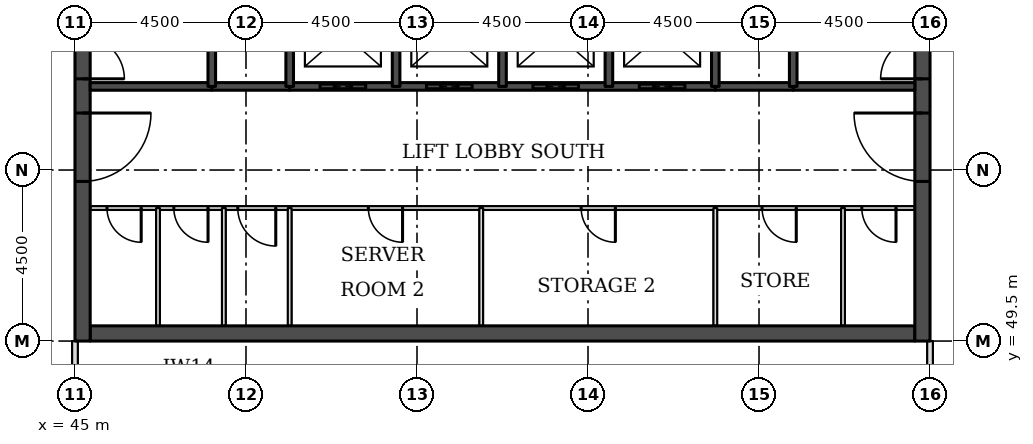
"""IFC4 building model, lengths in metres.
Left out: names, types, materials, properties, quantities, classifications, styles, units other than length and angle.
Written with IfcOpenShell. Run it as: python <this file> out.ifc"""

import sys

from ifc_helpers import new_model, si_unit, direction, frame, frame_2d, origin, place, context, subcontext, project, spatial, rectangle, extrude, element, fill, save


model = new_model("IFC4")
c1 = context("Model", 3, precision=1e-05, world=origin(), true_north=direction((0.0, 1.0)))
c2 = subcontext(c1, "Body", "Model", "MODEL_VIEW")
j1 = project(units=[si_unit("LENGTHUNIT", "METRE"), si_unit("PLANEANGLEUNIT", "RADIAN")], contexts=[c1])
p1 = place(None, origin())
s1 = spatial("IfcSite", under=j1, at=p1, CompositionType="ELEMENT")
p2 = place(p1, origin())
s2 = spatial("IfcBuilding", under=s1, at=p2, CompositionType="ELEMENT")
p3 = place(p2, frame((0.0, 0.0, 147.7)))
s3 = spatial("IfcBuildingStorey", under=s2, at=p3, CompositionType="ELEMENT", Elevation=147.7)
p4 = place(p3, frame((45.4, 49.7, 0.0), z_axis=(0.0, 0.0, 1.0), x_axis=(1.0, 0.0, 0.0)))
e1 = element("IfcWall", 1, at=p4, inside=s3, PredefinedType="SHEAR", context=c2, shape_type="SweptSolid", body=[
    extrude(rectangle(XDim=21.7, YDim=0.4, at=frame_2d((10.85, 0.0))), origin(), (0.0, 0.0, 1.0), 3.7),
])
p5 = place(p3, frame((45.2, 49.5, 0.0), z_axis=(0.0, 0.0, 1.0), x_axis=(0.0, 1.0, 0.0)))
e2 = element("IfcWall", 2, at=p5, inside=s3, PredefinedType="SHEAR", context=c2, shape_type="SweptSolid", body=[
    extrude(rectangle(XDim=22.5, YDim=0.4, at=frame_2d((11.25, 0.0))), origin(), (0.0, 0.0, 1.0), 3.7),
])
p6 = place(p5, frame((4.2, 0.0, 0.0)))
e3 = element("IfcOpeningElement", 3, at=p6, cuts=e2, PredefinedType="OPENING", context=c2, shape_type="SweptSolid", body=[
    extrude(rectangle(XDim=1.8, YDim=2.1, at=frame_2d((0.9, 1.05))), frame((0.0, 0.21, 0.0), z_axis=(0.0, -1.0, 0.0), x_axis=(1.0, 0.0, 0.0)), (0.0, 0.0, 1.0), 0.42),
])
p7 = place(p5, frame((6.9, 0.0, 0.0)))
e4 = element("IfcOpeningElement", 4, at=p7, cuts=e2, PredefinedType="OPENING", context=c2, shape_type="SweptSolid", body=[
    extrude(rectangle(XDim=1.1, YDim=2.1, at=frame_2d((0.55, 1.05))), frame((0.0, 0.21, 0.0), z_axis=(0.0, -1.0, 0.0), x_axis=(1.0, 0.0, 0.0)), (0.0, 0.0, 1.0), 0.42),
])
p8 = place(p5, frame((13.6, 0.0, 0.0)))
e5 = element("IfcOpeningElement", 5, at=p8, cuts=e2, PredefinedType="OPENING", context=c2, shape_type="SweptSolid", body=[
    extrude(rectangle(XDim=1.1, YDim=2.1, at=frame_2d((0.55, 1.05))), frame((0.0, 0.21, 0.0), z_axis=(0.0, -1.0, 0.0), x_axis=(1.0, 0.0, 0.0)), (0.0, 0.0, 1.0), 0.42),
])
p9 = place(p5, frame((16.5, 0.0, 0.0)))
e6 = element("IfcOpeningElement", 6, at=p9, cuts=e2, PredefinedType="OPENING", context=c2, shape_type="SweptSolid", body=[
    extrude(rectangle(XDim=1.8, YDim=2.1, at=frame_2d((0.9, 1.05))), frame((0.0, 0.21, 0.0), z_axis=(0.0, -1.0, 0.0), x_axis=(1.0, 0.0, 0.0)), (0.0, 0.0, 1.0), 0.42),
])
p10 = place(p3, frame((67.3, 49.5, 0.0), z_axis=(0.0, 0.0, 1.0), x_axis=(0.0, 1.0, 0.0)))
e7 = element("IfcWall", 7, at=p10, inside=s3, PredefinedType="SHEAR", context=c2, shape_type="SweptSolid", body=[
    extrude(rectangle(XDim=22.5, YDim=0.4, at=frame_2d((11.25, 0.0))), origin(), (0.0, 0.0, 1.0), 3.7),
])
p11 = place(p10, frame((4.2, 0.0, 0.0)))
e8 = element("IfcOpeningElement", 8, at=p11, cuts=e7, PredefinedType="OPENING", context=c2, shape_type="SweptSolid", body=[
    extrude(rectangle(XDim=1.8, YDim=2.1, at=frame_2d((0.9, 1.05))), frame((0.0, 0.21, 0.0), z_axis=(0.0, -1.0, 0.0), x_axis=(1.0, 0.0, 0.0)), (0.0, 0.0, 1.0), 0.42),
])
p12 = place(p10, frame((6.9, 0.0, 0.0)))
e9 = element("IfcOpeningElement", 9, at=p12, cuts=e7, PredefinedType="OPENING", context=c2, shape_type="SweptSolid", body=[
    extrude(rectangle(XDim=1.1, YDim=2.1, at=frame_2d((0.55, 1.05))), frame((0.0, 0.21, 0.0), z_axis=(0.0, -1.0, 0.0), x_axis=(1.0, 0.0, 0.0)), (0.0, 0.0, 1.0), 0.42),
])
p13 = place(p10, frame((13.6, 0.0, 0.0)))
e10 = element("IfcOpeningElement", 10, at=p13, cuts=e7, PredefinedType="OPENING", context=c2, shape_type="SweptSolid", body=[
    extrude(rectangle(XDim=1.1, YDim=2.1, at=frame_2d((0.55, 1.05))), frame((0.0, 0.21, 0.0), z_axis=(0.0, -1.0, 0.0), x_axis=(1.0, 0.0, 0.0)), (0.0, 0.0, 1.0), 0.42),
])
p14 = place(p10, frame((16.5, 0.0, 0.0)))
e11 = element("IfcOpeningElement", 11, at=p14, cuts=e7, PredefinedType="OPENING", context=c2, shape_type="SweptSolid", body=[
    extrude(rectangle(XDim=1.8, YDim=2.1, at=frame_2d((0.9, 1.05))), frame((0.0, 0.21, 0.0), z_axis=(0.0, -1.0, 0.0), x_axis=(1.0, 0.0, 0.0)), (0.0, 0.0, 1.0), 0.42),
])
p15 = place(p3, frame((67.5, 46.5, 0.0), z_axis=(0.0, 0.0, 1.0), x_axis=(0.0, 1.0, 0.0)))
e12 = element("IfcWall", 12, at=p15, inside=s3, PredefinedType="PARTITIONING", context=c2, shape_type="SweptSolid", body=[
    extrude(rectangle(XDim=3.0, YDim=0.15, at=frame_2d((1.5, 0.0))), origin(), (0.0, 0.0, 1.0), 3.022),
])
p16 = place(p3, frame((45.0, 48.0, 0.0), z_axis=(0.0, 0.0, 1.0), x_axis=(0.0, 1.0, 0.0)))
e13 = element("IfcWall", 13, at=p16, inside=s3, PredefinedType="PARTITIONING", context=c2, shape_type="SweptSolid", body=[
    extrude(rectangle(XDim=1.5, YDim=0.15, at=frame_2d((0.75, 0.0))), origin(), (0.0, 0.0, 1.0), 3.022),
])
p17 = place(p3, frame((45.4, 53.0, 0.0), z_axis=(0.0, 0.0, 1.0), x_axis=(1.0, 0.0, 0.0)))
e14 = element("IfcWall", 14, at=p17, inside=s3, PredefinedType="PARTITIONING", context=c2, shape_type="SweptSolid", body=[
    extrude(rectangle(XDim=21.7, YDim=0.1, at=frame_2d((10.85, 0.0))), origin(), (0.0, 0.0, 1.0), 3.55),
])
p18 = place(p17, frame((20.305, 0.0, 0.0)))
e15 = element("IfcOpeningElement", 15, at=p18, cuts=e14, PredefinedType="OPENING", context=c2, shape_type="SweptSolid", body=[
    extrude(rectangle(XDim=0.9, YDim=2.1, at=frame_2d((0.45, 1.05))), frame((0.0, 0.06, 0.0), z_axis=(0.0, -1.0, 0.0), x_axis=(1.0, 0.0, 0.0)), (0.0, 0.0, 1.0), 0.12),
])
p19 = place(p17, frame((17.68, 0.0, 0.0)))
e16 = element("IfcOpeningElement", 16, at=p19, cuts=e14, PredefinedType="OPENING", context=c2, shape_type="SweptSolid", body=[
    extrude(rectangle(XDim=0.9, YDim=2.1, at=frame_2d((0.45, 1.05))), frame((0.0, 0.06, 0.0), z_axis=(0.0, -1.0, 0.0), x_axis=(1.0, 0.0, 0.0)), (0.0, 0.0, 1.0), 0.12),
])
p20 = place(p17, frame((0.442, 0.0, 0.0)))
e17 = element("IfcOpeningElement", 17, at=p20, cuts=e14, PredefinedType="OPENING", context=c2, shape_type="SweptSolid", body=[
    extrude(rectangle(XDim=0.9, YDim=2.1, at=frame_2d((0.45, 1.05))), frame((0.0, 0.06, 0.0), z_axis=(0.0, -1.0, 0.0), x_axis=(1.0, 0.0, 0.0)), (0.0, 0.0, 1.0), 0.12),
])
p21 = place(p17, frame((2.201, 0.0, 0.0)))
e18 = element("IfcOpeningElement", 18, at=p21, cuts=e14, PredefinedType="OPENING", context=c2, shape_type="SweptSolid", body=[
    extrude(rectangle(XDim=0.9, YDim=2.1, at=frame_2d((0.45, 1.05))), frame((0.0, 0.06, 0.0), z_axis=(0.0, -1.0, 0.0), x_axis=(1.0, 0.0, 0.0)), (0.0, 0.0, 1.0), 0.12),
])
p22 = place(p17, frame((3.884, 0.0, 0.0)))
e19 = element("IfcOpeningElement", 19, at=p22, cuts=e14, PredefinedType="OPENING", context=c2, shape_type="SweptSolid", body=[
    extrude(rectangle(XDim=1.0, YDim=2.1, at=frame_2d((0.5, 1.05))), frame((0.0, 0.06, 0.0), z_axis=(0.0, -1.0, 0.0), x_axis=(1.0, 0.0, 0.0)), (0.0, 0.0, 1.0), 0.12),
])
p23 = place(p17, frame((7.32, 0.0, 0.0)))
e20 = element("IfcOpeningElement", 20, at=p23, cuts=e14, PredefinedType="OPENING", context=c2, shape_type="SweptSolid", body=[
    extrude(rectangle(XDim=0.9, YDim=2.1, at=frame_2d((0.45, 1.05))), frame((0.0, 0.06, 0.0), z_axis=(0.0, -1.0, 0.0), x_axis=(1.0, 0.0, 0.0)), (0.0, 0.0, 1.0), 0.12),
])
p24 = place(p17, frame((12.92, 0.0, 0.0)))
e21 = element("IfcOpeningElement", 21, at=p24, cuts=e14, PredefinedType="OPENING", context=c2, shape_type="SweptSolid", body=[
    extrude(rectangle(XDim=0.9, YDim=2.1, at=frame_2d((0.45, 1.05))), frame((0.0, 0.06, 0.0), z_axis=(0.0, -1.0, 0.0), x_axis=(1.0, 0.0, 0.0)), (0.0, 0.0, 1.0), 0.12),
])
for number, where, z_axis, x_axis in (
    (22, (48.6, 56.2, 0.0), (0.0, 0.0, 1.0), (1.0, 0.0, 0.0)),
    (23, (61.85, 56.2, 0.0), (0.0, 0.0, 1.0), (1.0, 0.0, 0.0)),
):
    element("IfcWall", number, at=place(p3, frame(where, z_axis=z_axis, x_axis=x_axis)), inside=s3, PredefinedType="SOLIDWALL", context=c2, shape_type="SweptSolid", body=[
        extrude(rectangle(XDim=2.05, YDim=0.2, at=frame_2d((1.025, 0.0))), origin(), (0.0, 0.0, 1.0), 3.55),
    ])
p25 = place(p3, frame((45.4, 56.2, 0.0), z_axis=(0.0, 0.0, 1.0), x_axis=(1.0, 0.0, 0.0)))
e24 = element("IfcWall", 24, at=p25, inside=s3, PredefinedType="SOLIDWALL", context=c2, shape_type="SweptSolid", body=[
    extrude(rectangle(XDim=3.2, YDim=0.2, at=frame_2d((1.6, 0.0))), origin(), (0.0, 0.0, 1.0), 3.55),
])
p26 = place(p3, frame((50.65, 56.2, 0.0), z_axis=(0.0, 0.0, 1.0), x_axis=(1.0, 0.0, 0.0)))
e25 = element("IfcWall", 25, at=p26, inside=s3, PredefinedType="SOLIDWALL", context=c2, shape_type="SweptSolid", body=[
    extrude(rectangle(XDim=11.2, YDim=0.2, at=frame_2d((5.6, 0.0))), origin(), (0.0, 0.0, 1.0), 3.55),
])
p27 = place(p26, frame((0.8, 0.0, 0.0)))
e26 = element("IfcOpeningElement", 26, at=p27, cuts=e25, PredefinedType="OPENING", context=c2, shape_type="SweptSolid", body=[
    extrude(rectangle(XDim=1.2, YDim=2.1, at=frame_2d((0.6, 1.05))), frame((0.0, 0.11, 0.0), z_axis=(0.0, -1.0, 0.0), x_axis=(1.0, 0.0, 0.0)), (0.0, 0.0, 1.0), 0.22),
])
p28 = place(p26, frame((3.6, 0.0, 0.0)))
e27 = element("IfcOpeningElement", 27, at=p28, cuts=e25, PredefinedType="OPENING", context=c2, shape_type="SweptSolid", body=[
    extrude(rectangle(XDim=1.2, YDim=2.1, at=frame_2d((0.6, 1.05))), frame((0.0, 0.11, 0.0), z_axis=(0.0, -1.0, 0.0), x_axis=(1.0, 0.0, 0.0)), (0.0, 0.0, 1.0), 0.22),
])
p29 = place(p26, frame((6.4, 0.0, 0.0)))
e28 = element("IfcOpeningElement", 28, at=p29, cuts=e25, PredefinedType="OPENING", context=c2, shape_type="SweptSolid", body=[
    extrude(rectangle(XDim=1.2, YDim=2.1, at=frame_2d((0.6, 1.05))), frame((0.0, 0.11, 0.0), z_axis=(0.0, -1.0, 0.0), x_axis=(1.0, 0.0, 0.0)), (0.0, 0.0, 1.0), 0.22),
])
p30 = place(p26, frame((9.2, 0.0, 0.0)))
e29 = element("IfcOpeningElement", 29, at=p30, cuts=e25, PredefinedType="OPENING", context=c2, shape_type="SweptSolid", body=[
    extrude(rectangle(XDim=1.2, YDim=2.1, at=frame_2d((0.6, 1.05))), frame((0.0, 0.11, 0.0), z_axis=(0.0, -1.0, 0.0), x_axis=(1.0, 0.0, 0.0)), (0.0, 0.0, 1.0), 0.22),
])
p31 = place(p3, frame((63.9, 56.2, 0.0), z_axis=(0.0, 0.0, 1.0), x_axis=(1.0, 0.0, 0.0)))
e30 = element("IfcWall", 30, at=p31, inside=s3, PredefinedType="SOLIDWALL", context=c2, shape_type="SweptSolid", body=[
    extrude(rectangle(XDim=3.2, YDim=0.2, at=frame_2d((1.6, 0.0))), origin(), (0.0, 0.0, 1.0), 3.55),
])
p32 = place(p3, frame((47.185, 49.9, 0.0), z_axis=(0.0, 0.0, 1.0), x_axis=(0.0, 1.0, 0.0)))
e31 = element("IfcWall", 31, at=p32, inside=s3, PredefinedType="PARTITIONING", context=c2, shape_type="SweptSolid", body=[
    extrude(rectangle(XDim=3.1, YDim=0.1, at=frame_2d((1.55, 0.0))), origin(), (0.0, 0.0, 1.0), 3.55),
])
p33 = place(p3, frame((48.6, 56.2, 0.0), z_axis=(0.0, 0.0, 1.0), x_axis=(0.0, 1.0, 0.0)))
e32 = element("IfcWall", 32, at=p33, inside=s3, PredefinedType="SOLIDWALL", context=c2, shape_type="SweptSolid", body=[
    extrude(rectangle(XDim=5.8, YDim=0.2, at=frame_2d((2.9, 0.0))), origin(), (0.0, 0.0, 1.0), 3.55),
])
for number, where, z_axis, x_axis in (
    (33, (48.917, 49.9, 0.0), (0.0, 0.0, 1.0), (0.0, 1.0, 0.0)),
    (34, (50.65, 49.9, 0.0), (0.0, 0.0, 1.0), (0.0, 1.0, 0.0)),
):
    element("IfcWall", number, at=place(p3, frame(where, z_axis=z_axis, x_axis=x_axis)), inside=s3, PredefinedType="PARTITIONING", context=c2, shape_type="SweptSolid", body=[
        extrude(rectangle(XDim=3.1, YDim=0.1, at=frame_2d((1.55, 0.0))), origin(), (0.0, 0.0, 1.0), 3.55),
    ])
for number, where, z_axis, x_axis in (
    (35, (50.65, 56.2, 0.0), (0.0, 0.0, 1.0), (0.0, 1.0, 0.0)),
    (36, (53.45, 56.2, 0.0), (0.0, 0.0, 1.0), (0.0, 1.0, 0.0)),
):
    element("IfcWall", number, at=place(p3, frame(where, z_axis=z_axis, x_axis=x_axis)), inside=s3, PredefinedType="SOLIDWALL", context=c2, shape_type="SweptSolid", body=[
        extrude(rectangle(XDim=2.8, YDim=0.2, at=frame_2d((1.4, 0.0))), origin(), (0.0, 0.0, 1.0), 3.55),
    ])
p34 = place(p3, frame((55.69, 49.9, 0.0), z_axis=(0.0, 0.0, 1.0), x_axis=(0.0, 1.0, 0.0)))
e37 = element("IfcWall", 37, at=p34, inside=s3, PredefinedType="PARTITIONING", context=c2, shape_type="SweptSolid", body=[
    extrude(rectangle(XDim=3.1, YDim=0.1, at=frame_2d((1.55, 0.0))), origin(), (0.0, 0.0, 1.0), 3.55),
])
for number, where, z_axis, x_axis in (
    (38, (56.25, 56.2, 0.0), (0.0, 0.0, 1.0), (0.0, 1.0, 0.0)),
    (39, (59.05, 56.2, 0.0), (0.0, 0.0, 1.0), (0.0, 1.0, 0.0)),
):
    element("IfcWall", number, at=place(p3, frame(where, z_axis=z_axis, x_axis=x_axis)), inside=s3, PredefinedType="SOLIDWALL", context=c2, shape_type="SweptSolid", body=[
        extrude(rectangle(XDim=2.8, YDim=0.2, at=frame_2d((1.4, 0.0))), origin(), (0.0, 0.0, 1.0), 3.55),
    ])
p35 = place(p3, frame((61.85, 49.9, 0.0), z_axis=(0.0, 0.0, 1.0), x_axis=(0.0, 1.0, 0.0)))
e40 = element("IfcWall", 40, at=p35, inside=s3, PredefinedType="PARTITIONING", context=c2, shape_type="SweptSolid", body=[
    extrude(rectangle(XDim=3.1, YDim=0.1, at=frame_2d((1.55, 0.0))), origin(), (0.0, 0.0, 1.0), 3.55),
])
p36 = place(p3, frame((61.85, 56.2, 0.0), z_axis=(0.0, 0.0, 1.0), x_axis=(0.0, 1.0, 0.0)))
e41 = element("IfcWall", 41, at=p36, inside=s3, PredefinedType="SOLIDWALL", context=c2, shape_type="SweptSolid", body=[
    extrude(rectangle(XDim=2.8, YDim=0.2, at=frame_2d((1.4, 0.0))), origin(), (0.0, 0.0, 1.0), 3.55),
])
p37 = place(p3, frame((63.9, 56.2, 0.0), z_axis=(0.0, 0.0, 1.0), x_axis=(0.0, 1.0, 0.0)))
e42 = element("IfcWall", 42, at=p37, inside=s3, PredefinedType="SOLIDWALL", context=c2, shape_type="SweptSolid", body=[
    extrude(rectangle(XDim=5.8, YDim=0.2, at=frame_2d((2.9, 0.0))), origin(), (0.0, 0.0, 1.0), 3.55),
])
p38 = place(p3, frame((65.21, 49.9, 0.0), z_axis=(0.0, 0.0, 1.0), x_axis=(0.0, 1.0, 0.0)))
e43 = element("IfcWall", 43, at=p38, inside=s3, PredefinedType="PARTITIONING", context=c2, shape_type="SweptSolid", body=[
    extrude(rectangle(XDim=3.1, YDim=0.1, at=frame_2d((1.55, 0.0))), origin(), (0.0, 0.0, 1.0), 3.55),
])
p39 = place(p27, origin())
e44 = element("IfcDoor", 44, at=p39, inside=s3, OperationType="DOUBLE_DOOR_SLIDING", PredefinedType="DOOR", context=c2, shape_type="SweptSolid", body=[
    extrude(rectangle(XDim=1.2, YDim=2.1, at=frame_2d((0.6, 1.05))), frame((0.0, 0.025, 0.0), z_axis=(0.0, -1.0, 0.0), x_axis=(1.0, 0.0, 0.0)), (0.0, 0.0, 1.0), 0.05),
])
fill(e26, e44)
p40 = place(p28, origin())
e45 = element("IfcDoor", 45, at=p40, inside=s3, OperationType="DOUBLE_DOOR_SLIDING", PredefinedType="DOOR", context=c2, shape_type="SweptSolid", body=[
    extrude(rectangle(XDim=1.2, YDim=2.1, at=frame_2d((0.6, 1.05))), frame((0.0, 0.025, 0.0), z_axis=(0.0, -1.0, 0.0), x_axis=(1.0, 0.0, 0.0)), (0.0, 0.0, 1.0), 0.05),
])
fill(e27, e45)
p41 = place(p29, origin())
e46 = element("IfcDoor", 46, at=p41, inside=s3, OperationType="DOUBLE_DOOR_SLIDING", PredefinedType="DOOR", context=c2, shape_type="SweptSolid", body=[
    extrude(rectangle(XDim=1.2, YDim=2.1, at=frame_2d((0.6, 1.05))), frame((0.0, 0.025, 0.0), z_axis=(0.0, -1.0, 0.0), x_axis=(1.0, 0.0, 0.0)), (0.0, 0.0, 1.0), 0.05),
])
fill(e28, e46)
p42 = place(p30, origin())
e47 = element("IfcDoor", 47, at=p42, inside=s3, OperationType="DOUBLE_DOOR_SLIDING", PredefinedType="DOOR", context=c2, shape_type="SweptSolid", body=[
    extrude(rectangle(XDim=1.2, YDim=2.1, at=frame_2d((0.6, 1.05))), frame((0.0, 0.025, 0.0), z_axis=(0.0, -1.0, 0.0), x_axis=(1.0, 0.0, 0.0)), (0.0, 0.0, 1.0), 0.05),
])
fill(e29, e47)
p43 = place(p6, frame((1.8, 0.0, 0.0), z_axis=(0.0, 0.0, 1.0), x_axis=(-1.0, 0.0, 0.0)))
e48 = element("IfcDoor", 48, at=p43, inside=s3, OperationType="SINGLE_SWING_LEFT", PredefinedType="DOOR", context=c2, shape_type="SweptSolid", body=[
    extrude(rectangle(XDim=1.8, YDim=2.1, at=frame_2d((0.9, 1.05))), frame((0.0, 0.025, 0.0), z_axis=(0.0, -1.0, 0.0), x_axis=(1.0, 0.0, 0.0)), (0.0, 0.0, 1.0), 0.05),
])
fill(e3, e48)
p44 = place(p7, frame((1.1, 0.0, 0.0), z_axis=(0.0, 0.0, 1.0), x_axis=(-1.0, 0.0, 0.0)))
e49 = element("IfcDoor", 49, at=p44, inside=s3, OperationType="SINGLE_SWING_RIGHT", PredefinedType="DOOR", context=c2, shape_type="SweptSolid", body=[
    extrude(rectangle(XDim=1.1, YDim=2.1, at=frame_2d((0.55, 1.05))), frame((0.0, 0.025, 0.0), z_axis=(0.0, -1.0, 0.0), x_axis=(1.0, 0.0, 0.0)), (0.0, 0.0, 1.0), 0.05),
])
fill(e4, e49)
p45 = place(p11, origin())
e50 = element("IfcDoor", 50, at=p45, inside=s3, OperationType="SINGLE_SWING_RIGHT", PredefinedType="DOOR", context=c2, shape_type="SweptSolid", body=[
    extrude(rectangle(XDim=1.8, YDim=2.1, at=frame_2d((0.9, 1.05))), frame((0.0, 0.025, 0.0), z_axis=(0.0, -1.0, 0.0), x_axis=(1.0, 0.0, 0.0)), (0.0, 0.0, 1.0), 0.05),
])
fill(e8, e50)
p46 = place(p12, origin())
e51 = element("IfcDoor", 51, at=p46, inside=s3, OperationType="SINGLE_SWING_LEFT", PredefinedType="DOOR", context=c2, shape_type="SweptSolid", body=[
    extrude(rectangle(XDim=1.1, YDim=2.1, at=frame_2d((0.55, 1.05))), frame((0.0, 0.025, 0.0), z_axis=(0.0, -1.0, 0.0), x_axis=(1.0, 0.0, 0.0)), (0.0, 0.0, 1.0), 0.05),
])
fill(e9, e51)
p47 = place(p18, frame((0.9, 0.0, 0.0), z_axis=(0.0, 0.0, 1.0), x_axis=(-1.0, 0.0, 0.0)))
e52 = element("IfcDoor", 52, at=p47, inside=s3, OperationType="SINGLE_SWING_LEFT", PredefinedType="DOOR", context=c2, shape_type="SweptSolid", body=[
    extrude(rectangle(XDim=0.9, YDim=2.1, at=frame_2d((0.45, 1.05))), frame((0.0, 0.025, 0.0), z_axis=(0.0, -1.0, 0.0), x_axis=(1.0, 0.0, 0.0)), (0.0, 0.0, 1.0), 0.05),
])
fill(e15, e52)
p48 = place(p19, frame((0.9, 0.0, 0.0), z_axis=(0.0, 0.0, 1.0), x_axis=(-1.0, 0.0, 0.0)))
e53 = element("IfcDoor", 53, at=p48, inside=s3, OperationType="SINGLE_SWING_LEFT", PredefinedType="DOOR", context=c2, shape_type="SweptSolid", body=[
    extrude(rectangle(XDim=0.9, YDim=2.1, at=frame_2d((0.45, 1.05))), frame((0.0, 0.025, 0.0), z_axis=(0.0, -1.0, 0.0), x_axis=(1.0, 0.0, 0.0)), (0.0, 0.0, 1.0), 0.05),
])
fill(e16, e53)
p49 = place(p20, frame((0.9, 0.0, 0.0), z_axis=(0.0, 0.0, 1.0), x_axis=(-1.0, 0.0, 0.0)))
e54 = element("IfcDoor", 54, at=p49, inside=s3, OperationType="SINGLE_SWING_LEFT", PredefinedType="DOOR", context=c2, shape_type="SweptSolid", body=[
    extrude(rectangle(XDim=0.9, YDim=2.1, at=frame_2d((0.45, 1.05))), frame((0.0, 0.025, 0.0), z_axis=(0.0, -1.0, 0.0), x_axis=(1.0, 0.0, 0.0)), (0.0, 0.0, 1.0), 0.05),
])
fill(e17, e54)
p50 = place(p21, frame((0.9, 0.0, 0.0), z_axis=(0.0, 0.0, 1.0), x_axis=(-1.0, 0.0, 0.0)))
e55 = element("IfcDoor", 55, at=p50, inside=s3, OperationType="SINGLE_SWING_LEFT", PredefinedType="DOOR", context=c2, shape_type="SweptSolid", body=[
    extrude(rectangle(XDim=0.9, YDim=2.1, at=frame_2d((0.45, 1.05))), frame((0.0, 0.025, 0.0), z_axis=(0.0, -1.0, 0.0), x_axis=(1.0, 0.0, 0.0)), (0.0, 0.0, 1.0), 0.05),
])
fill(e18, e55)
p51 = place(p22, frame((1.0, 0.0, 0.0), z_axis=(0.0, 0.0, 1.0), x_axis=(-1.0, 0.0, 0.0)))
e56 = element("IfcDoor", 56, at=p51, inside=s3, OperationType="SINGLE_SWING_LEFT", PredefinedType="DOOR", context=c2, shape_type="SweptSolid", body=[
    extrude(rectangle(XDim=1.0, YDim=2.1, at=frame_2d((0.5, 1.05))), frame((0.0, 0.025, 0.0), z_axis=(0.0, -1.0, 0.0), x_axis=(1.0, 0.0, 0.0)), (0.0, 0.0, 1.0), 0.05),
])
fill(e19, e56)
p52 = place(p23, frame((0.9, 0.0, 0.0), z_axis=(0.0, 0.0, 1.0), x_axis=(-1.0, 0.0, 0.0)))
e57 = element("IfcDoor", 57, at=p52, inside=s3, OperationType="SINGLE_SWING_LEFT", PredefinedType="DOOR", context=c2, shape_type="SweptSolid", body=[
    extrude(rectangle(XDim=0.9, YDim=2.1, at=frame_2d((0.45, 1.05))), frame((0.0, 0.025, 0.0), z_axis=(0.0, -1.0, 0.0), x_axis=(1.0, 0.0, 0.0)), (0.0, 0.0, 1.0), 0.05),
])
fill(e20, e57)
p53 = place(p24, frame((0.9, 0.0, 0.0), z_axis=(0.0, 0.0, 1.0), x_axis=(-1.0, 0.0, 0.0)))
e58 = element("IfcDoor", 58, at=p53, inside=s3, OperationType="SINGLE_SWING_LEFT", PredefinedType="DOOR", context=c2, shape_type="SweptSolid", body=[
    extrude(rectangle(XDim=0.9, YDim=2.1, at=frame_2d((0.45, 1.05))), frame((0.0, 0.025, 0.0), z_axis=(0.0, -1.0, 0.0), x_axis=(1.0, 0.0, 0.0)), (0.0, 0.0, 1.0), 0.05),
])
fill(e21, e58)
save(model, sys.argv[1])
